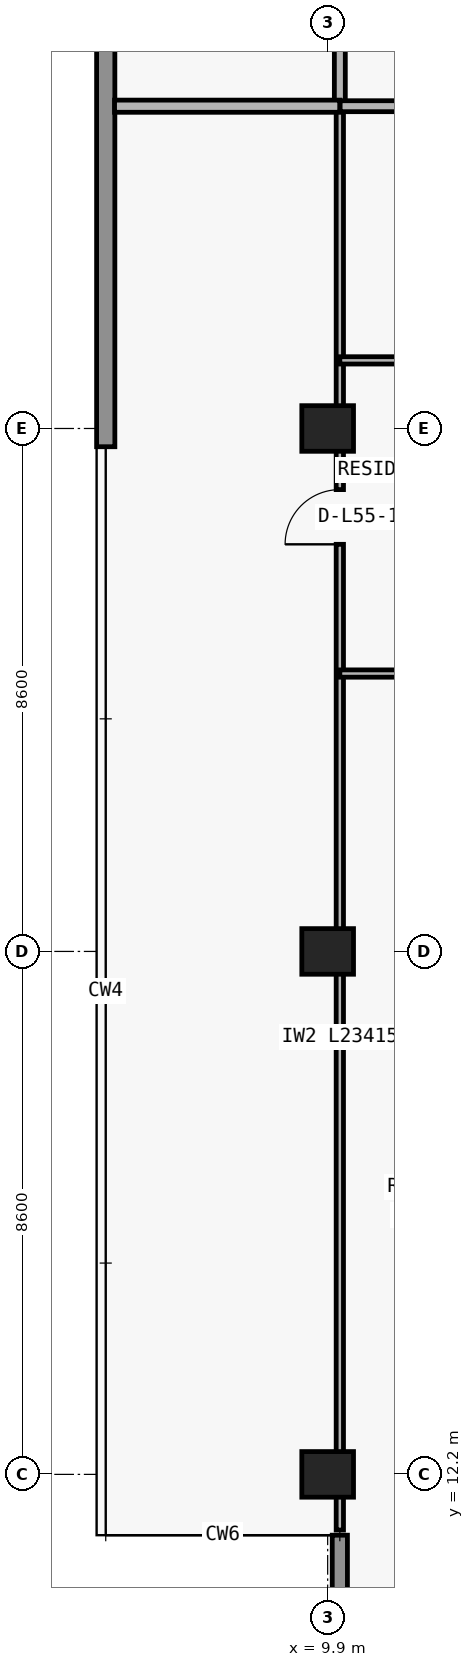
"""IFC4 building model, lengths in metres.
Left out: names, types, materials, properties, quantities, classifications, styles, units other than length and angle.
Written with IfcOpenShell. Run it as: python <this file> out.ifc"""

import sys

from ifc_helpers import new_model, si_unit, direction, frame, frame_2d, origin, origin_2d, place, context, subcontext, project, spatial, rectangle, extrude, element, fill, save


model = new_model("IFC4")
c1 = context("Model", 3, precision=1e-05, world=origin(), true_north=direction((0.0, 1.0)))
c2 = subcontext(c1, "Body", "Model", "MODEL_VIEW")
j1 = project(units=[si_unit("LENGTHUNIT", "METRE"), si_unit("PLANEANGLEUNIT", "RADIAN")], contexts=[c1])
p1 = place(None, origin())
s1 = spatial("IfcSite", under=j1, at=p1, CompositionType="ELEMENT")
p2 = place(p1, origin())
s2 = spatial("IfcBuilding", under=s1, at=p2, CompositionType="ELEMENT")
p3 = place(p2, frame((0.0, 0.0, 198.3)))
s3 = spatial("IfcBuildingStorey", under=s2, at=p3, CompositionType="ELEMENT", Elevation=198.3)
for number, where, z_axis, x_axis in (
    (1, (9.9, 12.2, 0.0), (0.0, 0.0, 1.0), (1.0, 0.0, 0.0)),
    (2, (9.9, 20.8, 0.0), (0.0, 0.0, 1.0), (1.0, 0.0, 0.0)),
    (3, (9.9, 29.4, 0.0), (0.0, 0.0, 1.0), (1.0, 0.0, 0.0)),
):
    element("IfcColumn", number, at=place(p3, frame(where, z_axis=z_axis, x_axis=x_axis)), inside=s3, PredefinedType="COLUMN", context=c2, shape_type="SweptSolid", body=[
        extrude(rectangle(XDim=0.85, YDim=0.75, at=origin_2d()), origin(), (0.0, 0.0, 1.0), 3.05),
    ])
p4 = place(p3, frame((10.1, 11.2, 0.0), z_axis=(0.0, 0.0, 1.0), x_axis=(0.0, -1.0, 0.0)))
e4 = element("IfcWall", 4, at=p4, inside=s3, PredefinedType="ELEMENTEDWALL", context=c2, shape_type="SweptSolid", body=[
    extrude(rectangle(XDim=3.45, YDim=0.25, at=frame_2d((1.725, 0.0))), origin(), (0.0, 0.0, 1.0), 3.05),
])
p5 = place(p3, frame((6.25, 29.1, 0.0), z_axis=(0.0, 0.0, 1.0), x_axis=(0.0, 1.0, 0.0)))
e5 = element("IfcWall", 5, at=p5, inside=s3, PredefinedType="STANDARD", context=c2, shape_type="SweptSolid", body=[
    extrude(rectangle(XDim=17.9, YDim=0.3, at=frame_2d((8.95, 0.0))), origin(), (0.0, 0.0, 1.0), 3.05),
])
p6 = place(p3, frame((10.1, 11.285, 0.0), z_axis=(0.0, 0.0, 1.0), x_axis=(0.0, 1.0, 0.0)))
e6 = element("IfcWall", 6, at=p6, inside=s3, PredefinedType="PARTITIONING", context=c2, shape_type="SweptSolid", body=[
    extrude(rectangle(XDim=23.415, YDim=0.12, at=frame_2d((11.708, 0.0))), origin(), (0.0, 0.0, 1.0), 2.263),
])
p7 = place(p6, frame((16.21, 0.0, 0.0)))
e7 = element("IfcOpeningElement", 7, at=p7, cuts=e6, PredefinedType="OPENING", context=c2, shape_type="SweptSolid", body=[
    extrude(rectangle(XDim=0.9, YDim=2.15, at=frame_2d((0.45, 1.075))), frame((0.0, 0.07, 0.0), z_axis=(0.0, -1.0, 0.0), x_axis=(1.0, 0.0, 0.0)), (0.0, 0.0, 1.0), 0.14),
])
p8 = place(p3, frame((10.1, 34.705, 0.0), z_axis=(0.0, 0.0, 1.0), x_axis=(0.0, 1.0, 0.0)))
e8 = element("IfcWall", 8, at=p8, inside=s3, PredefinedType="PARTITIONING", context=c2, shape_type="SweptSolid", body=[
    extrude(rectangle(XDim=2.295, YDim=0.18, at=frame_2d((1.147, 0.0))), origin(), (0.0, 0.0, 1.0), 2.263),
])
p9 = place(p3, frame((10.1, 25.37, 0.0), z_axis=(0.0, 0.0, 1.0), x_axis=(1.0, 0.0, 0.0)))
e9 = element("IfcWall", 9, at=p9, inside=s3, PredefinedType="PARTITIONING", context=c2, shape_type="SweptSolid", body=[
    extrude(rectangle(XDim=8.2, YDim=0.12, at=frame_2d((4.1, 0.0))), origin(), (0.0, 0.0, 1.0), 3.05),
])
p10 = place(p9, frame((1.477, 0.0, 0.0)))
e10 = element("IfcOpeningElement", 10, at=p10, cuts=e9, PredefinedType="OPENING", context=c2, shape_type="SweptSolid", body=[
    extrude(rectangle(XDim=0.9, YDim=2.15, at=frame_2d((0.45, 1.075))), frame((0.0, 0.07, 0.0), z_axis=(0.0, -1.0, 0.0), x_axis=(1.0, 0.0, 0.0)), (0.0, 0.0, 1.0), 0.14),
])
p11 = place(p9, frame((5.989, 0.0, 0.0)))
e11 = element("IfcOpeningElement", 11, at=p11, cuts=e9, PredefinedType="OPENING", context=c2, shape_type="SweptSolid", body=[
    extrude(rectangle(XDim=0.9, YDim=2.15, at=frame_2d((0.45, 1.075))), frame((0.0, 0.07, 0.0), z_axis=(0.0, -1.0, 0.0), x_axis=(1.0, 0.0, 0.0)), (0.0, 0.0, 1.0), 0.14),
])
p12 = place(p3, frame((10.1, 30.52, 0.0), z_axis=(0.0, 0.0, 1.0), x_axis=(1.0, 0.0, 0.0)))
e12 = element("IfcWall", 12, at=p12, inside=s3, PredefinedType="PARTITIONING", context=c2, shape_type="SweptSolid", body=[
    extrude(rectangle(XDim=8.2, YDim=0.12, at=frame_2d((4.1, 0.0))), origin(), (0.0, 0.0, 1.0), 3.05),
])
p13 = place(p12, frame((1.889, 0.0, 0.0)))
e13 = element("IfcOpeningElement", 13, at=p13, cuts=e12, PredefinedType="OPENING", context=c2, shape_type="SweptSolid", body=[
    extrude(rectangle(XDim=0.9, YDim=2.15, at=frame_2d((0.45, 1.075))), frame((0.0, 0.07, 0.0), z_axis=(0.0, -1.0, 0.0), x_axis=(1.0, 0.0, 0.0)), (0.0, 0.0, 1.0), 0.14),
])
p14 = place(p3, frame((6.395, 34.7, 0.0), z_axis=(0.0, 0.0, 1.0), x_axis=(1.0, 0.0, 0.0)))
e14 = element("IfcWall", 14, at=p14, inside=s3, PredefinedType="PARTITIONING", context=c2, shape_type="SweptSolid", body=[
    extrude(rectangle(XDim=3.705, YDim=0.2, at=frame_2d((1.853, 0.0))), origin(), (0.0, 0.0, 1.0), 3.05),
])
p15 = place(p3, frame((10.105, 34.7, 0.0), z_axis=(0.0, 0.0, 1.0), x_axis=(1.0, 0.0, 0.0)))
e15 = element("IfcWall", 15, at=p15, inside=s3, PredefinedType="PARTITIONING", context=c2, shape_type="SweptSolid", body=[
    extrude(rectangle(XDim=57.595, YDim=0.18, at=frame_2d((28.797, 0.0))), origin(), (0.0, 0.0, 1.0), 3.05),
])
p16 = place(p15, frame((2.365, 0.0, 0.0)))
e16 = element("IfcOpeningElement", 16, at=p16, cuts=e15, PredefinedType="OPENING", context=c2, shape_type="SweptSolid", body=[
    extrude(rectangle(XDim=1.0, YDim=2.2, at=frame_2d((0.5, 1.1))), frame((0.0, 0.1, 0.0), z_axis=(0.0, -1.0, 0.0), x_axis=(1.0, 0.0, 0.0)), (0.0, 0.0, 1.0), 0.2),
])
p17 = place(p15, frame((10.833, 0.0, 0.0)))
e17 = element("IfcOpeningElement", 17, at=p17, cuts=e15, PredefinedType="OPENING", context=c2, shape_type="SweptSolid", body=[
    extrude(rectangle(XDim=1.0, YDim=2.2, at=frame_2d((0.5, 1.1))), frame((0.0, 0.1, 0.0), z_axis=(0.0, -1.0, 0.0), x_axis=(1.0, 0.0, 0.0)), (0.0, 0.0, 1.0), 0.2),
])
p18 = place(p15, frame((19.422, 0.0, 0.0)))
e18 = element("IfcOpeningElement", 18, at=p18, cuts=e15, PredefinedType="OPENING", context=c2, shape_type="SweptSolid", body=[
    extrude(rectangle(XDim=1.0, YDim=2.2, at=frame_2d((0.5, 1.1))), frame((0.0, 0.1, 0.0), z_axis=(0.0, -1.0, 0.0), x_axis=(1.0, 0.0, 0.0)), (0.0, 0.0, 1.0), 0.2),
])
p19 = place(p15, frame((43.865, 0.0, 0.0)))
e19 = element("IfcOpeningElement", 19, at=p19, cuts=e15, PredefinedType="OPENING", context=c2, shape_type="SweptSolid", body=[
    extrude(rectangle(XDim=1.0, YDim=2.2, at=frame_2d((0.5, 1.1))), frame((0.0, 0.1, 0.0), z_axis=(0.0, -1.0, 0.0), x_axis=(1.0, 0.0, 0.0)), (0.0, 0.0, 1.0), 0.2),
])
p20 = place(p7, origin())
e20 = element("IfcDoor", 20, at=p20, inside=s3, OperationType="SINGLE_SWING_LEFT", PredefinedType="DOOR", context=c2, shape_type="SweptSolid", body=[
    extrude(rectangle(XDim=0.9, YDim=2.15, at=frame_2d((0.45, 1.075))), frame((0.0, 0.025, 0.0), z_axis=(0.0, -1.0, 0.0), x_axis=(1.0, 0.0, 0.0)), (0.0, 0.0, 1.0), 0.05),
])
fill(e7, e20)
save(model, sys.argv[1])
